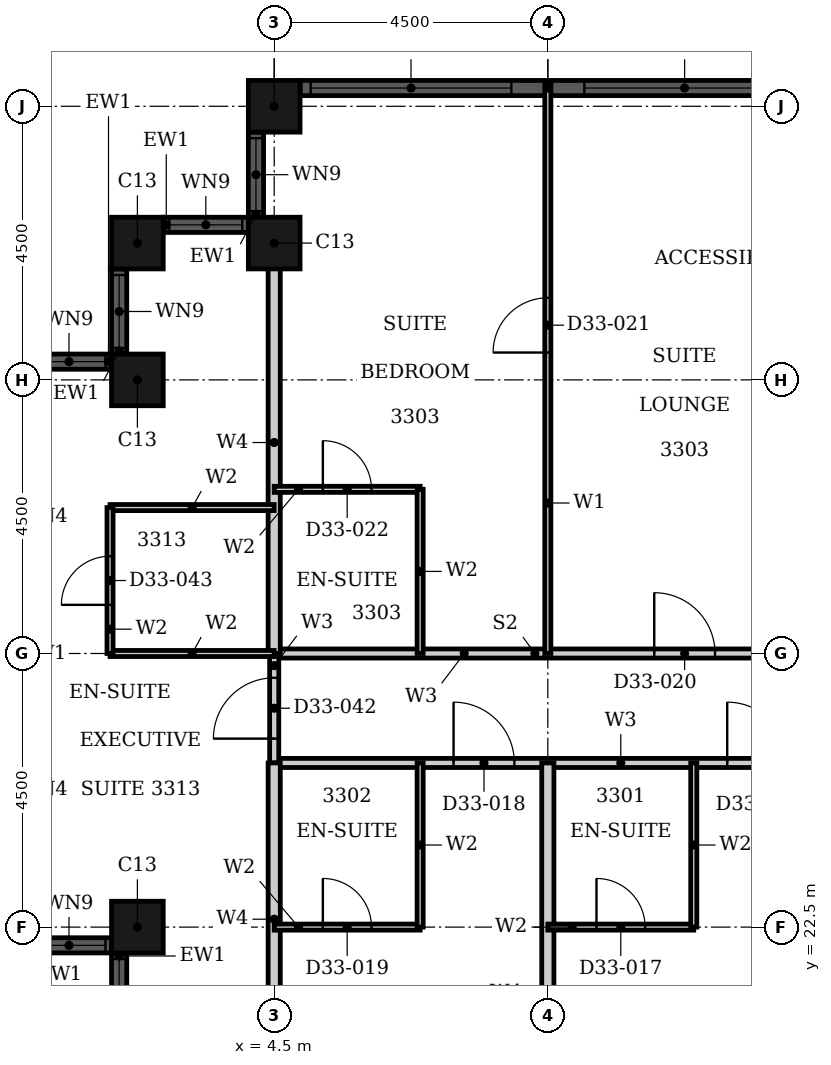
"""IFC4 building model, lengths in metres.
Left out: names, types, materials, properties, quantities, classifications, styles, units other than length and angle.
Written with IfcOpenShell. Run it as: python <this file> out.ifc"""

import sys

from ifc_helpers import new_model, si_unit, direction, frame, frame_2d, origin, origin_2d, place, context, subcontext, project, spatial, rectangle, hollow_rectangle, extrude, element, fill, save


model = new_model("IFC4")
c1 = context("Model", 3, precision=1e-05, world=origin(), true_north=direction((0.0, 1.0)))
c2 = subcontext(c1, "Body", "Model", "MODEL_VIEW")
j1 = project(units=[si_unit("LENGTHUNIT", "METRE"), si_unit("PLANEANGLEUNIT", "RADIAN")], contexts=[c1])
p1 = place(None, origin())
s1 = spatial("IfcSite", under=j1, at=p1, CompositionType="ELEMENT")
p2 = place(p1, origin())
s2 = spatial("IfcBuilding", under=s1, at=p2, CompositionType="ELEMENT")
p3 = place(p2, frame((0.0, 0.0, 133.2)))
s3 = spatial("IfcBuildingStorey", under=s2, at=p3, CompositionType="ELEMENT", Elevation=133.2)
for number, where, z_axis, x_axis in (
    (1, (4.5, 36.0, 0.0), (0.0, 0.0, 1.0), (1.0, 0.0, 0.0)),
    (2, (4.5, 33.75, 0.0), (0.0, 0.0, 1.0), (1.0, 0.0, 0.0)),
    (3, (2.25, 33.75, 0.0), (0.0, 0.0, 1.0), (1.0, 0.0, 0.0)),
    (4, (2.25, 31.5, 0.0), (0.0, 0.0, 1.0), (1.0, 0.0, 0.0)),
    (5, (2.25, 22.5, 0.0), (0.0, 0.0, 1.0), (1.0, 0.0, 0.0)),
):
    element("IfcColumn", number, at=place(p3, frame(where, z_axis=z_axis, x_axis=x_axis)), inside=s3, PredefinedType="COLUMN", context=c2, shape_type="SweptSolid", body=[
        extrude(hollow_rectangle(XDim=0.85, YDim=0.85, WallThickness=0.026, at=origin_2d()), origin(), (0.0, 0.0, 1.0), 3.6),
    ])
p4 = place(p3, frame((13.075, 36.3, 0.0), z_axis=(0.0, 0.0, 1.0), x_axis=(-1.0, 0.0, 0.0)))
e6 = element("IfcWall", 6, at=p4, inside=s3, PredefinedType="SOLIDWALL", context=c2, shape_type="SweptSolid", body=[
    extrude(rectangle(XDim=8.15, YDim=0.25, at=frame_2d((4.075, 0.0))), origin(), (0.0, 0.0, 1.0), 3.6),
])
p5 = place(p4, frame((0.175, 0.0, 0.9)))
e7 = element("IfcOpeningElement", 7, at=p5, cuts=e6, PredefinedType="OPENING", context=c2, shape_type="SweptSolid", body=[
    extrude(rectangle(XDim=3.3, YDim=2.08, at=frame_2d((1.65, 1.04))), frame((0.0, 0.135, 0.0), z_axis=(0.0, -1.0, 0.0), x_axis=(1.0, 0.0, 0.0)), (0.0, 0.0, 1.0), 0.27),
])
p6 = place(p4, frame((4.675, 0.0, 0.9)))
e8 = element("IfcOpeningElement", 8, at=p6, cuts=e6, PredefinedType="OPENING", context=c2, shape_type="SweptSolid", body=[
    extrude(rectangle(XDim=3.3, YDim=2.08, at=frame_2d((1.65, 1.04))), frame((0.0, 0.135, 0.0), z_axis=(0.0, -1.0, 0.0), x_axis=(1.0, 0.0, 0.0)), (0.0, 0.0, 1.0), 0.27),
])
p7 = place(p3, frame((4.2, 35.575, 0.0), z_axis=(0.0, 0.0, 1.0), x_axis=(0.0, -1.0, 0.0)))
e9 = element("IfcWall", 9, at=p7, inside=s3, PredefinedType="SOLIDWALL", context=c2, shape_type="SweptSolid", body=[
    extrude(rectangle(XDim=1.4, YDim=0.25, at=frame_2d((0.7, 0.0))), origin(), (0.0, 0.0, 1.0), 3.6),
])
p8 = place(p7, frame((0.1, 0.0, 0.9)))
e10 = element("IfcOpeningElement", 10, at=p8, cuts=e9, PredefinedType="OPENING", context=c2, shape_type="SweptSolid", body=[
    extrude(rectangle(XDim=1.2, YDim=2.08, at=frame_2d((0.6, 1.04))), frame((0.0, 0.135, 0.0), z_axis=(0.0, -1.0, 0.0), x_axis=(1.0, 0.0, 0.0)), (0.0, 0.0, 1.0), 0.27),
])
p9 = place(p3, frame((4.075, 34.05, 0.0), z_axis=(0.0, 0.0, 1.0), x_axis=(-1.0, 0.0, 0.0)))
e11 = element("IfcWall", 11, at=p9, inside=s3, PredefinedType="SOLIDWALL", context=c2, shape_type="SweptSolid", body=[
    extrude(rectangle(XDim=1.4, YDim=0.25, at=frame_2d((0.7, 0.0))), origin(), (0.0, 0.0, 1.0), 3.6),
])
p10 = place(p9, frame((0.1, 0.0, 0.9)))
e12 = element("IfcOpeningElement", 12, at=p10, cuts=e11, PredefinedType="OPENING", context=c2, shape_type="SweptSolid", body=[
    extrude(rectangle(XDim=1.2, YDim=2.08, at=frame_2d((0.6, 1.04))), frame((0.0, 0.135, 0.0), z_axis=(0.0, -1.0, 0.0), x_axis=(1.0, 0.0, 0.0)), (0.0, 0.0, 1.0), 0.27),
])
p11 = place(p3, frame((1.95, 33.325, 0.0), z_axis=(0.0, 0.0, 1.0), x_axis=(0.0, -1.0, 0.0)))
e13 = element("IfcWall", 13, at=p11, inside=s3, PredefinedType="SOLIDWALL", context=c2, shape_type="SweptSolid", body=[
    extrude(rectangle(XDim=1.4, YDim=0.25, at=frame_2d((0.7, 0.0))), origin(), (0.0, 0.0, 1.0), 3.6),
])
p12 = place(p11, frame((0.1, 0.0, 0.9)))
e14 = element("IfcOpeningElement", 14, at=p12, cuts=e13, PredefinedType="OPENING", context=c2, shape_type="SweptSolid", body=[
    extrude(rectangle(XDim=1.2, YDim=2.08, at=frame_2d((0.6, 1.04))), frame((0.0, 0.135, 0.0), z_axis=(0.0, -1.0, 0.0), x_axis=(1.0, 0.0, 0.0)), (0.0, 0.0, 1.0), 0.27),
])
p13 = place(p3, frame((1.825, 31.8, 0.0), z_axis=(0.0, 0.0, 1.0), x_axis=(-1.0, 0.0, 0.0)))
e15 = element("IfcWall", 15, at=p13, inside=s3, PredefinedType="SOLIDWALL", context=c2, shape_type="SweptSolid", body=[
    extrude(rectangle(XDim=1.4, YDim=0.25, at=frame_2d((0.7, 0.0))), origin(), (0.0, 0.0, 1.0), 3.6),
])
p14 = place(p13, frame((0.1, 0.0, 0.9)))
e16 = element("IfcOpeningElement", 16, at=p14, cuts=e15, PredefinedType="OPENING", context=c2, shape_type="SweptSolid", body=[
    extrude(rectangle(XDim=1.2, YDim=2.08, at=frame_2d((0.6, 1.04))), frame((0.0, 0.135, 0.0), z_axis=(0.0, -1.0, 0.0), x_axis=(1.0, 0.0, 0.0)), (0.0, 0.0, 1.0), 0.27),
])
p15 = place(p3, frame((0.425, 22.2, 0.0), z_axis=(0.0, 0.0, 1.0), x_axis=(1.0, 0.0, 0.0)))
e17 = element("IfcWall", 17, at=p15, inside=s3, PredefinedType="SOLIDWALL", context=c2, shape_type="SweptSolid", body=[
    extrude(rectangle(XDim=1.4, YDim=0.25, at=frame_2d((0.7, 0.0))), origin(), (0.0, 0.0, 1.0), 3.6),
])
p16 = place(p15, frame((0.1, 0.0, 0.9)))
e18 = element("IfcOpeningElement", 18, at=p16, cuts=e17, PredefinedType="OPENING", context=c2, shape_type="SweptSolid", body=[
    extrude(rectangle(XDim=1.2, YDim=2.08, at=frame_2d((0.6, 1.04))), frame((0.0, 0.135, 0.0), z_axis=(0.0, -1.0, 0.0), x_axis=(1.0, 0.0, 0.0)), (0.0, 0.0, 1.0), 0.27),
])
p17 = place(p3, frame((1.95, 22.075, 0.0), z_axis=(0.0, 0.0, 1.0), x_axis=(0.0, -1.0, 0.0)))
e19 = element("IfcWall", 19, at=p17, inside=s3, PredefinedType="SOLIDWALL", context=c2, shape_type="SweptSolid", body=[
    extrude(rectangle(XDim=1.4, YDim=0.25, at=frame_2d((0.7, 0.0))), origin(), (0.0, 0.0, 1.0), 3.6),
])
p18 = place(p17, frame((0.1, 0.0, 0.9)))
e20 = element("IfcOpeningElement", 20, at=p18, cuts=e19, PredefinedType="OPENING", context=c2, shape_type="SweptSolid", body=[
    extrude(rectangle(XDim=1.2, YDim=2.08, at=frame_2d((0.6, 1.04))), frame((0.0, 0.135, 0.0), z_axis=(0.0, -1.0, 0.0), x_axis=(1.0, 0.0, 0.0)), (0.0, 0.0, 1.0), 0.27),
])
p19 = place(p3, frame((4.5, 25.2, 0.0), z_axis=(0.0, 0.0, 1.0), x_axis=(1.0, 0.0, 0.0)))
e21 = element("IfcWall", 21, at=p19, inside=s3, PredefinedType="PARTITIONING", context=c2, shape_type="SweptSolid", body=[
    extrude(rectangle(XDim=11.7, YDim=0.15, at=frame_2d((5.85, 0.0))), origin(), (0.0, 0.0, 1.0), 3.3),
])
p20 = place(p19, frame((7.45, 0.0, 0.0)))
e22 = element("IfcOpeningElement", 22, at=p20, cuts=e21, PredefinedType="OPENING", context=c2, shape_type="SweptSolid", body=[
    extrude(rectangle(XDim=1.0, YDim=2.1, at=frame_2d((0.5, 1.05))), frame((0.0, 0.085, 0.0), z_axis=(0.0, -1.0, 0.0), x_axis=(1.0, 0.0, 0.0)), (0.0, 0.0, 1.0), 0.17),
])
p21 = place(p19, frame((2.95, 0.0, 0.0)))
e23 = element("IfcOpeningElement", 23, at=p21, cuts=e21, PredefinedType="OPENING", context=c2, shape_type="SweptSolid", body=[
    extrude(rectangle(XDim=1.0, YDim=2.1, at=frame_2d((0.5, 1.05))), frame((0.0, 0.085, 0.0), z_axis=(0.0, -1.0, 0.0), x_axis=(1.0, 0.0, 0.0)), (0.0, 0.0, 1.0), 0.17),
])
p22 = place(p3, frame((4.5, 27.0, 0.0), z_axis=(0.0, 0.0, 1.0), x_axis=(1.0, 0.0, 0.0)))
e24 = element("IfcWall", 24, at=p22, inside=s3, PredefinedType="PARTITIONING", context=c2, shape_type="SweptSolid", body=[
    extrude(rectangle(XDim=11.7, YDim=0.15, at=frame_2d((5.85, 0.0))), origin(), (0.0, 0.0, 1.0), 2.58),
])
p23 = place(p22, frame((6.25, 0.0, 0.0)))
e25 = element("IfcOpeningElement", 25, at=p23, cuts=e24, PredefinedType="OPENING", context=c2, shape_type="SweptSolid", body=[
    extrude(rectangle(XDim=1.0, YDim=2.1, at=frame_2d((0.5, 1.05))), frame((0.0, 0.085, 0.0), z_axis=(0.0, -1.0, 0.0), x_axis=(1.0, 0.0, 0.0)), (0.0, 0.0, 1.0), 0.17),
])
p24 = place(p3, frame((4.5, 25.2, 0.0), z_axis=(0.0, 0.0, 1.0), x_axis=(0.0, 1.0, 0.0)))
e26 = element("IfcWall", 26, at=p24, inside=s3, PredefinedType="PARTITIONING", context=c2, shape_type="SweptSolid", body=[
    extrude(rectangle(XDim=1.8, YDim=0.15, at=frame_2d((0.9, 0.0))), origin(), (0.0, 0.0, 1.0), 3.3),
])
p25 = place(p24, frame((0.4, 0.0, 0.0)))
e27 = element("IfcOpeningElement", 27, at=p25, cuts=e26, PredefinedType="OPENING", context=c2, shape_type="SweptSolid", body=[
    extrude(rectangle(XDim=1.0, YDim=2.1, at=frame_2d((0.5, 1.05))), frame((0.0, 0.085, 0.0), z_axis=(0.0, -1.0, 0.0), x_axis=(1.0, 0.0, 0.0)), (0.0, 0.0, 1.0), 0.17),
])
p26 = place(p3, frame((9.0, 27.0, 0.0), z_axis=(0.0, 0.0, 1.0), x_axis=(0.0, 1.0, 0.0)))
e28 = element("IfcWall", 28, at=p26, inside=s3, PredefinedType="PARTITIONING", context=c2, shape_type="SweptSolid", body=[
    extrude(rectangle(XDim=9.365, YDim=0.1, at=frame_2d((4.683, 0.0))), origin(), (0.0, 0.0, 1.0), 3.3),
])
p27 = place(p26, frame((4.95, 0.0, 0.0)))
e29 = element("IfcOpeningElement", 29, at=p27, cuts=e28, PredefinedType="OPENING", context=c2, shape_type="SweptSolid", body=[
    extrude(rectangle(XDim=0.9, YDim=2.1, at=frame_2d((0.45, 1.05))), frame((0.0, 0.06, 0.0), z_axis=(0.0, -1.0, 0.0), x_axis=(1.0, 0.0, 0.0)), (0.0, 0.0, 1.0), 0.12),
])
p28 = place(p3, frame((4.5, 20.06, 0.0), z_axis=(0.0, 0.0, 1.0), x_axis=(0.0, 1.0, 0.0)))
e30 = element("IfcWall", 30, at=p28, inside=s3, PredefinedType="PARTITIONING", context=c2, shape_type="SweptSolid", body=[
    extrude(rectangle(XDim=5.14, YDim=0.2, at=frame_2d((2.57, 0.0))), origin(), (0.0, 0.0, 1.0), 3.3),
])
p29 = place(p3, frame((4.5, 27.0, 0.0), z_axis=(0.0, 0.0, 1.0), x_axis=(0.0, 1.0, 0.0)))
e31 = element("IfcWall", 31, at=p29, inside=s3, PredefinedType="PARTITIONING", context=c2, shape_type="SweptSolid", body=[
    extrude(rectangle(XDim=6.94, YDim=0.2, at=frame_2d((3.47, 0.0))), origin(), (0.0, 0.0, 1.0), 3.3),
])
p30 = place(p3, frame((9.0, 17.635, 0.0), z_axis=(0.0, 0.0, 1.0), x_axis=(0.0, 1.0, 0.0)))
e32 = element("IfcWall", 32, at=p30, inside=s3, PredefinedType="PARTITIONING", context=c2, shape_type="SweptSolid", body=[
    extrude(rectangle(XDim=7.565, YDim=0.2, at=frame_2d((3.782, 0.0))), origin(), (0.0, 0.0, 1.0), 3.3),
])
p31 = place(p3, frame((9.0, 22.5, 0.0), z_axis=(0.0, 0.0, 1.0), x_axis=(1.0, 0.0, 0.0)))
e33 = element("IfcWall", 33, at=p31, inside=s3, PredefinedType="PARTITIONING", context=c2, shape_type="SweptSolid", body=[
    extrude(rectangle(XDim=2.4, YDim=0.1, at=frame_2d((1.2, 0.0))), origin(), (0.0, 0.0, 1.0), 2.58),
])
p32 = place(p31, frame((0.8, 0.0, 0.0)))
e34 = element("IfcOpeningElement", 34, at=p32, cuts=e33, PredefinedType="OPENING", context=c2, shape_type="SweptSolid", body=[
    extrude(rectangle(XDim=0.8, YDim=2.1, at=frame_2d((0.4, 1.05))), frame((0.0, 0.06, 0.0), z_axis=(0.0, -1.0, 0.0), x_axis=(1.0, 0.0, 0.0)), (0.0, 0.0, 1.0), 0.12),
])
p33 = place(p3, frame((4.5, 22.5, 0.0), z_axis=(0.0, 0.0, 1.0), x_axis=(1.0, 0.0, 0.0)))
e35 = element("IfcWall", 35, at=p33, inside=s3, PredefinedType="PARTITIONING", context=c2, shape_type="SweptSolid", body=[
    extrude(rectangle(XDim=2.4, YDim=0.1, at=frame_2d((1.2, 0.0))), origin(), (0.0, 0.0, 1.0), 2.58),
])
p34 = place(p33, frame((0.8, 0.0, 0.0)))
e36 = element("IfcOpeningElement", 36, at=p34, cuts=e35, PredefinedType="OPENING", context=c2, shape_type="SweptSolid", body=[
    extrude(rectangle(XDim=0.8, YDim=2.1, at=frame_2d((0.4, 1.05))), frame((0.0, 0.06, 0.0), z_axis=(0.0, -1.0, 0.0), x_axis=(1.0, 0.0, 0.0)), (0.0, 0.0, 1.0), 0.12),
])
p35 = place(p3, frame((1.8, 27.0, 0.0), z_axis=(0.0, 0.0, 1.0), x_axis=(1.0, 0.0, 0.0)))
e37 = element("IfcWall", 37, at=p35, inside=s3, PredefinedType="PARTITIONING", context=c2, shape_type="SweptSolid", body=[
    extrude(rectangle(XDim=2.7, YDim=0.1, at=frame_2d((1.35, 0.0))), origin(), (0.0, 0.0, 1.0), 2.58),
])
p36 = place(p3, frame((1.8, 29.4, 0.0), z_axis=(0.0, 0.0, 1.0), x_axis=(1.0, 0.0, 0.0)))
e38 = element("IfcWall", 38, at=p36, inside=s3, PredefinedType="PARTITIONING", context=c2, shape_type="SweptSolid", body=[
    extrude(rectangle(XDim=2.7, YDim=0.1, at=frame_2d((1.35, 0.0))), origin(), (0.0, 0.0, 1.0), 3.3),
])
p37 = place(p3, frame((4.5, 29.7, 0.0), z_axis=(0.0, 0.0, 1.0), x_axis=(1.0, 0.0, 0.0)))
e39 = element("IfcWall", 39, at=p37, inside=s3, PredefinedType="PARTITIONING", context=c2, shape_type="SweptSolid", body=[
    extrude(rectangle(XDim=2.4, YDim=0.1, at=frame_2d((1.2, 0.0))), origin(), (0.0, 0.0, 1.0), 3.3),
])
p38 = place(p37, frame((0.8, 0.0, 0.0)))
e40 = element("IfcOpeningElement", 40, at=p38, cuts=e39, PredefinedType="OPENING", context=c2, shape_type="SweptSolid", body=[
    extrude(rectangle(XDim=0.8, YDim=2.1, at=frame_2d((0.4, 1.05))), frame((0.0, 0.06, 0.0), z_axis=(0.0, -1.0, 0.0), x_axis=(1.0, 0.0, 0.0)), (0.0, 0.0, 1.0), 0.12),
])
p39 = place(p3, frame((1.8, 27.0, 0.0), z_axis=(0.0, 0.0, 1.0), x_axis=(0.0, 1.0, 0.0)))
e41 = element("IfcWall", 41, at=p39, inside=s3, PredefinedType="PARTITIONING", context=c2, shape_type="SweptSolid", body=[
    extrude(rectangle(XDim=2.4, YDim=0.1, at=frame_2d((1.2, 0.0))), origin(), (0.0, 0.0, 1.0), 3.3),
])
p40 = place(p39, frame((0.8, 0.0, 0.0)))
e42 = element("IfcOpeningElement", 42, at=p40, cuts=e41, PredefinedType="OPENING", context=c2, shape_type="SweptSolid", body=[
    extrude(rectangle(XDim=0.8, YDim=2.1, at=frame_2d((0.4, 1.05))), frame((0.0, 0.06, 0.0), z_axis=(0.0, -1.0, 0.0), x_axis=(1.0, 0.0, 0.0)), (0.0, 0.0, 1.0), 0.12),
])
for number, where, z_axis, x_axis in (
    (43, (11.4, 22.5, 0.0), (0.0, 0.0, 1.0), (0.0, 1.0, 0.0)),
    (44, (6.9, 22.5, 0.0), (0.0, 0.0, 1.0), (0.0, 1.0, 0.0)),
    (45, (6.9, 27.0, 0.0), (0.0, 0.0, 1.0), (0.0, 1.0, 0.0)),
):
    element("IfcWall", number, at=place(p3, frame(where, z_axis=z_axis, x_axis=x_axis)), inside=s3, PredefinedType="PARTITIONING", context=c2, shape_type="SweptSolid", body=[
        extrude(rectangle(XDim=2.7, YDim=0.1, at=frame_2d((1.35, 0.0))), origin(), (0.0, 0.0, 1.0), 3.3),
    ])
p41 = place(p5, origin())
e46 = element("IfcWindow", 46, at=p41, inside=s3, PartitioningType="SINGLE_PANEL", PredefinedType="WINDOW", context=c2, shape_type="SweptSolid", body=[
    extrude(rectangle(XDim=3.3, YDim=2.08, at=frame_2d((1.65, 1.04))), frame((0.0, 0.03, 0.0), z_axis=(0.0, -1.0, 0.0), x_axis=(1.0, 0.0, 0.0)), (0.0, 0.0, 1.0), 0.06),
])
fill(e7, e46)
p42 = place(p6, origin())
e47 = element("IfcWindow", 47, at=p42, inside=s3, PartitioningType="SINGLE_PANEL", PredefinedType="WINDOW", context=c2, shape_type="SweptSolid", body=[
    extrude(rectangle(XDim=3.3, YDim=2.08, at=frame_2d((1.65, 1.04))), frame((0.0, 0.03, 0.0), z_axis=(0.0, -1.0, 0.0), x_axis=(1.0, 0.0, 0.0)), (0.0, 0.0, 1.0), 0.06),
])
fill(e8, e47)
p43 = place(p8, origin())
e48 = element("IfcWindow", 48, at=p43, inside=s3, PartitioningType="SINGLE_PANEL", PredefinedType="WINDOW", context=c2, shape_type="SweptSolid", body=[
    extrude(rectangle(XDim=1.2, YDim=2.08, at=frame_2d((0.6, 1.04))), frame((0.0, 0.03, 0.0), z_axis=(0.0, -1.0, 0.0), x_axis=(1.0, 0.0, 0.0)), (0.0, 0.0, 1.0), 0.06),
])
fill(e10, e48)
p44 = place(p10, origin())
e49 = element("IfcWindow", 49, at=p44, inside=s3, PartitioningType="SINGLE_PANEL", PredefinedType="WINDOW", context=c2, shape_type="SweptSolid", body=[
    extrude(rectangle(XDim=1.2, YDim=2.08, at=frame_2d((0.6, 1.04))), frame((0.0, 0.03, 0.0), z_axis=(0.0, -1.0, 0.0), x_axis=(1.0, 0.0, 0.0)), (0.0, 0.0, 1.0), 0.06),
])
fill(e12, e49)
p45 = place(p12, origin())
e50 = element("IfcWindow", 50, at=p45, inside=s3, PartitioningType="SINGLE_PANEL", PredefinedType="WINDOW", context=c2, shape_type="SweptSolid", body=[
    extrude(rectangle(XDim=1.2, YDim=2.08, at=frame_2d((0.6, 1.04))), frame((0.0, 0.03, 0.0), z_axis=(0.0, -1.0, 0.0), x_axis=(1.0, 0.0, 0.0)), (0.0, 0.0, 1.0), 0.06),
])
fill(e14, e50)
p46 = place(p14, origin())
e51 = element("IfcWindow", 51, at=p46, inside=s3, PartitioningType="SINGLE_PANEL", PredefinedType="WINDOW", context=c2, shape_type="SweptSolid", body=[
    extrude(rectangle(XDim=1.2, YDim=2.08, at=frame_2d((0.6, 1.04))), frame((0.0, 0.03, 0.0), z_axis=(0.0, -1.0, 0.0), x_axis=(1.0, 0.0, 0.0)), (0.0, 0.0, 1.0), 0.06),
])
fill(e16, e51)
p47 = place(p16, origin())
e52 = element("IfcWindow", 52, at=p47, inside=s3, PartitioningType="SINGLE_PANEL", PredefinedType="WINDOW", context=c2, shape_type="SweptSolid", body=[
    extrude(rectangle(XDim=1.2, YDim=2.08, at=frame_2d((0.6, 1.04))), frame((0.0, 0.03, 0.0), z_axis=(0.0, -1.0, 0.0), x_axis=(1.0, 0.0, 0.0)), (0.0, 0.0, 1.0), 0.06),
])
fill(e18, e52)
p48 = place(p18, origin())
e53 = element("IfcWindow", 53, at=p48, inside=s3, PartitioningType="SINGLE_PANEL", PredefinedType="WINDOW", context=c2, shape_type="SweptSolid", body=[
    extrude(rectangle(XDim=1.2, YDim=2.08, at=frame_2d((0.6, 1.04))), frame((0.0, 0.03, 0.0), z_axis=(0.0, -1.0, 0.0), x_axis=(1.0, 0.0, 0.0)), (0.0, 0.0, 1.0), 0.06),
])
fill(e20, e53)
p49 = place(p20, origin())
e54 = element("IfcDoor", 54, at=p49, inside=s3, OperationType="SINGLE_SWING_RIGHT", PredefinedType="DOOR", context=c2, shape_type="SweptSolid", body=[
    extrude(rectangle(XDim=1.0, YDim=2.1, at=frame_2d((0.5, 1.05))), frame((0.0, 0.025, 0.0), z_axis=(0.0, -1.0, 0.0), x_axis=(1.0, 0.0, 0.0)), (0.0, 0.0, 1.0), 0.05),
])
fill(e22, e54)
p50 = place(p32, origin())
e55 = element("IfcDoor", 55, at=p50, inside=s3, OperationType="SINGLE_SWING_LEFT", PredefinedType="DOOR", context=c2, shape_type="SweptSolid", body=[
    extrude(rectangle(XDim=0.8, YDim=2.1, at=frame_2d((0.4, 1.05))), frame((0.0, 0.025, 0.0), z_axis=(0.0, -1.0, 0.0), x_axis=(1.0, 0.0, 0.0)), (0.0, 0.0, 1.0), 0.05),
])
fill(e34, e55)
p51 = place(p21, origin())
e56 = element("IfcDoor", 56, at=p51, inside=s3, OperationType="SINGLE_SWING_RIGHT", PredefinedType="DOOR", context=c2, shape_type="SweptSolid", body=[
    extrude(rectangle(XDim=1.0, YDim=2.1, at=frame_2d((0.5, 1.05))), frame((0.0, 0.025, 0.0), z_axis=(0.0, -1.0, 0.0), x_axis=(1.0, 0.0, 0.0)), (0.0, 0.0, 1.0), 0.05),
])
fill(e23, e56)
p52 = place(p34, origin())
e57 = element("IfcDoor", 57, at=p52, inside=s3, OperationType="SINGLE_SWING_RIGHT", PredefinedType="DOOR", context=c2, shape_type="SweptSolid", body=[
    extrude(rectangle(XDim=0.8, YDim=2.1, at=frame_2d((0.4, 1.05))), frame((0.0, 0.025, 0.0), z_axis=(0.0, -1.0, 0.0), x_axis=(1.0, 0.0, 0.0)), (0.0, 0.0, 1.0), 0.05),
])
fill(e36, e57)
p53 = place(p23, origin())
e58 = element("IfcDoor", 58, at=p53, inside=s3, OperationType="SINGLE_SWING_LEFT", PredefinedType="DOOR", context=c2, shape_type="SweptSolid", body=[
    extrude(rectangle(XDim=1.0, YDim=2.1, at=frame_2d((0.5, 1.05))), frame((0.0, 0.025, 0.0), z_axis=(0.0, -1.0, 0.0), x_axis=(1.0, 0.0, 0.0)), (0.0, 0.0, 1.0), 0.05),
])
fill(e25, e58)
p54 = place(p27, origin())
e59 = element("IfcDoor", 59, at=p54, inside=s3, OperationType="SINGLE_SWING_RIGHT", PredefinedType="DOOR", context=c2, shape_type="SweptSolid", body=[
    extrude(rectangle(XDim=0.9, YDim=2.1, at=frame_2d((0.45, 1.05))), frame((0.0, 0.025, 0.0), z_axis=(0.0, -1.0, 0.0), x_axis=(1.0, 0.0, 0.0)), (0.0, 0.0, 1.0), 0.05),
])
fill(e29, e59)
p55 = place(p38, origin())
e60 = element("IfcDoor", 60, at=p55, inside=s3, OperationType="SINGLE_SWING_LEFT", PredefinedType="DOOR", context=c2, shape_type="SweptSolid", body=[
    extrude(rectangle(XDim=0.8, YDim=2.1, at=frame_2d((0.4, 1.05))), frame((0.0, 0.025, 0.0), z_axis=(0.0, -1.0, 0.0), x_axis=(1.0, 0.0, 0.0)), (0.0, 0.0, 1.0), 0.05),
])
fill(e40, e60)
p56 = place(p25, origin())
e61 = element("IfcDoor", 61, at=p56, inside=s3, OperationType="SINGLE_SWING_LEFT", PredefinedType="DOOR", context=c2, shape_type="SweptSolid", body=[
    extrude(rectangle(XDim=1.0, YDim=2.1, at=frame_2d((0.5, 1.05))), frame((0.0, 0.025, 0.0), z_axis=(0.0, -1.0, 0.0), x_axis=(1.0, 0.0, 0.0)), (0.0, 0.0, 1.0), 0.05),
])
fill(e27, e61)
p57 = place(p40, origin())
e62 = element("IfcDoor", 62, at=p57, inside=s3, OperationType="SINGLE_SWING_RIGHT", PredefinedType="DOOR", context=c2, shape_type="SweptSolid", body=[
    extrude(rectangle(XDim=0.8, YDim=2.1, at=frame_2d((0.4, 1.05))), frame((0.0, 0.025, 0.0), z_axis=(0.0, -1.0, 0.0), x_axis=(1.0, 0.0, 0.0)), (0.0, 0.0, 1.0), 0.05),
])
fill(e42, e62)
save(model, sys.argv[1])
